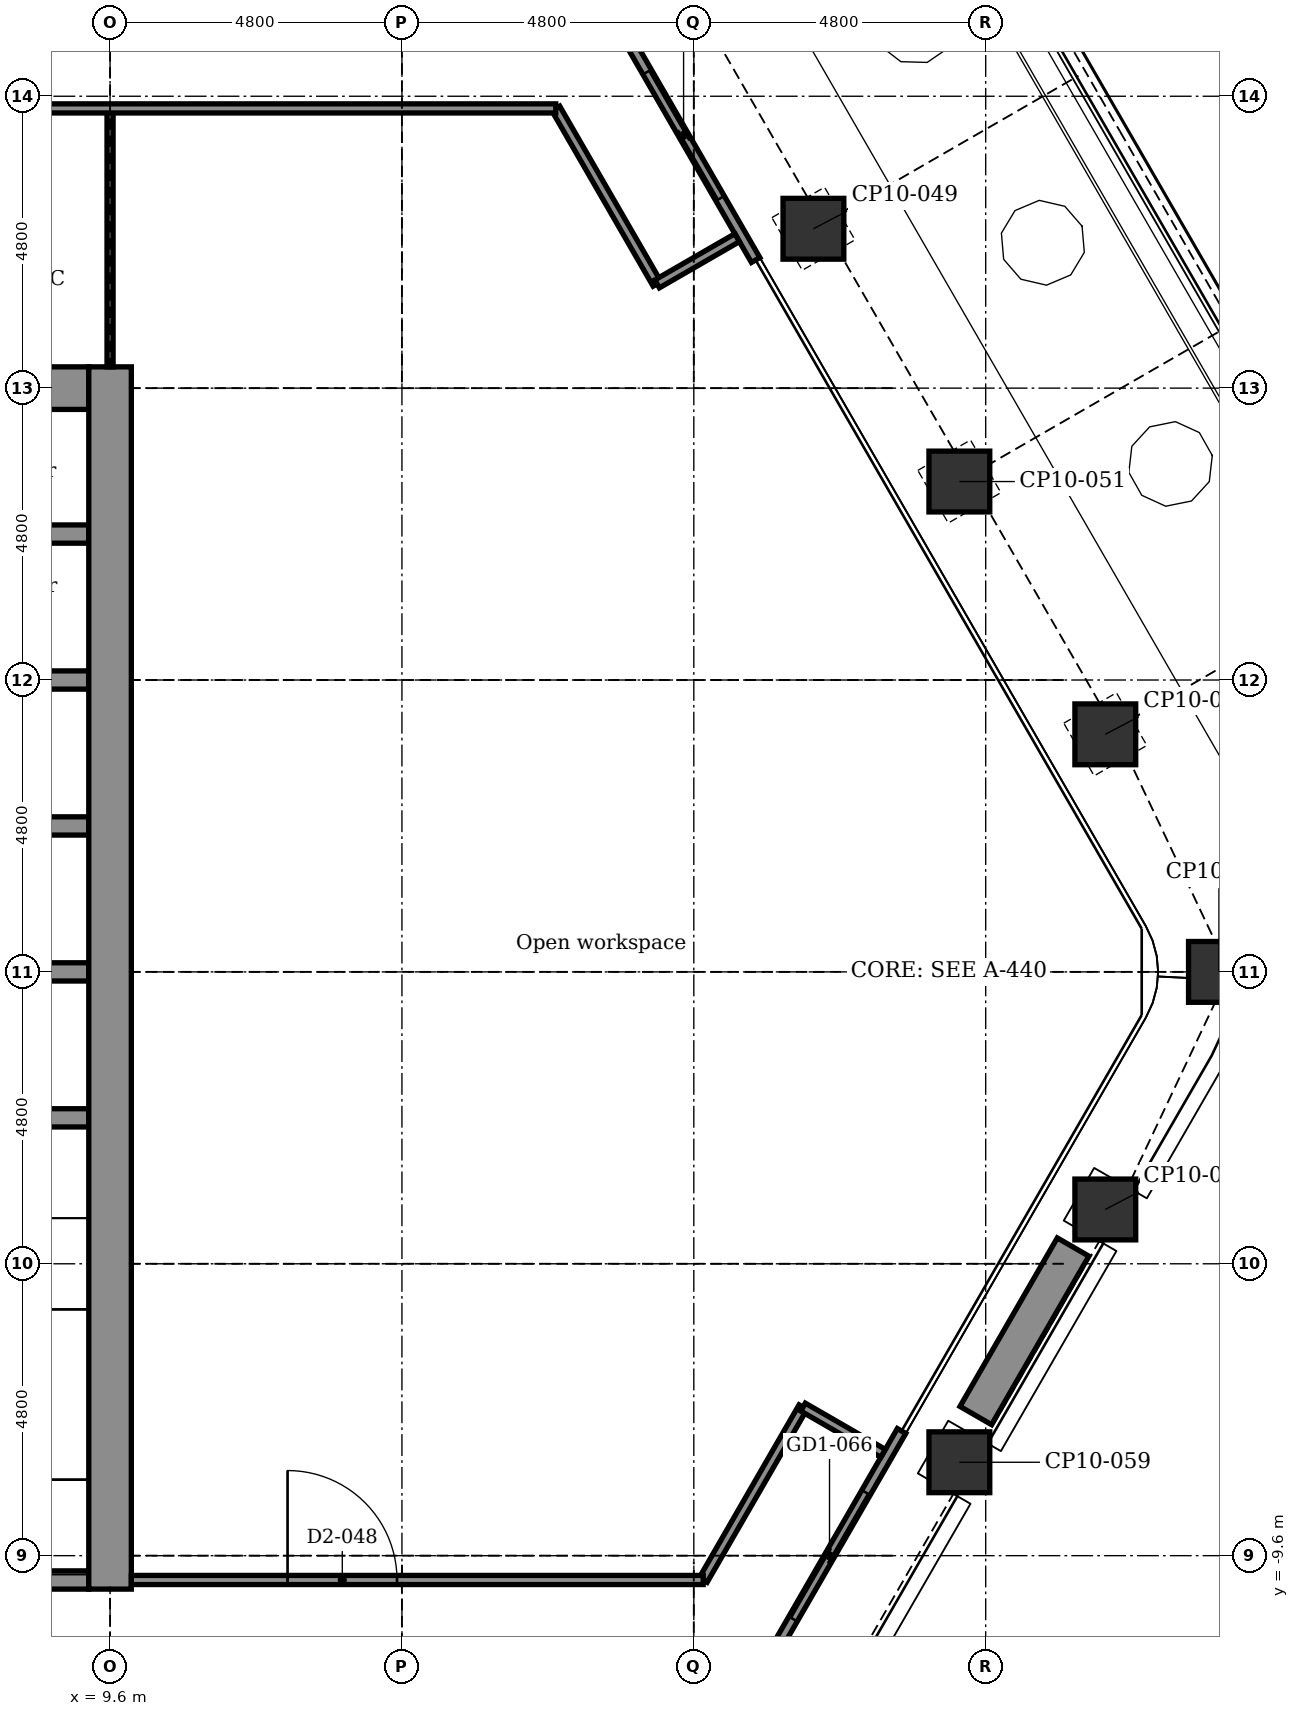
"""IFC4 building model, lengths in metres.
Left out: names, types, materials, properties, quantities, classifications, styles, units other than length and angle.
Written with IfcOpenShell. Run it as: python <this file> out.ifc"""

import sys

from ifc_helpers import new_model, si_unit, direction, frame, frame_2d, origin, origin_2d, place, context, subcontext, project, spatial, rectangle, extrude, element, fill, save


model = new_model("IFC4")
c1 = context("Model", 3, precision=1e-05, world=origin(), true_north=direction((0.0, 1.0)))
c2 = subcontext(c1, "Body", "Model", "MODEL_VIEW")
j1 = project(units=[si_unit("LENGTHUNIT", "METRE"), si_unit("PLANEANGLEUNIT", "RADIAN")], contexts=[c1])
p1 = place(None, origin())
s1 = spatial("IfcSite", under=j1, at=p1, CompositionType="ELEMENT")
p2 = place(p1, origin())
s2 = spatial("IfcBuilding", under=s1, at=p2, CompositionType="ELEMENT")
p3 = place(p2, frame((0.0, 0.0, 166.1)))
s3 = spatial("IfcBuildingStorey", under=s2, at=p3, CompositionType="ELEMENT", Elevation=166.1)
for number, where, z_axis, x_axis in (
    (1, (21.167, 12.221, -0.15), (0.0, 0.0, 1.0), (0.866, 0.5, 0.0)),
    (2, (23.567, 8.064, -0.15), (0.0, 0.0, 1.0), (0.866, 0.5, 0.0)),
    (3, (25.967, 3.907, -0.15), (0.0, 0.0, 1.0), (0.866, 0.5, 0.0)),
    (4, (27.836, 0.0, -0.15), (0.0, 0.0, 1.0), (1.0, 0.0, 0.0)),
    (5, (25.967, -3.907, -0.15), (0.0, 0.0, 1.0), (0.5, 0.866, 0.0)),
    (6, (23.567, -8.064, -0.15), (0.0, 0.0, 1.0), (0.5, 0.866, 0.0)),
):
    element("IfcColumn", number, at=place(p3, frame(where, z_axis=z_axis, x_axis=x_axis)), inside=s3, PredefinedType="COLUMN", context=c2, shape_type="SweptSolid", body=[
        extrude(rectangle(XDim=1.0, YDim=1.0, at=origin_2d()), origin(), (0.0, 0.0, 1.0), 3.9),
    ])
p4 = place(p3, frame((4.95, -10.0, -0.15), z_axis=(0.0, 0.0, 1.0), x_axis=(1.0, 0.0, 0.0)))
e7 = element("IfcWall", 7, at=p4, inside=s3, PredefinedType="STANDARD", context=c2, shape_type="SweptSolid", body=[
    extrude(rectangle(XDim=4.3, YDim=0.3, at=frame_2d((2.15, 0.0))), origin(), (0.0, 0.0, 1.0), 3.9),
])
for number, where, z_axis, x_axis in (
    (8, (6.15, -2.4, -0.15), (0.0, 0.0, 1.0), (1.0, 0.0, 0.0)),
    (9, (6.15, 0.0, -0.15), (0.0, 0.0, 1.0), (1.0, 0.0, 0.0)),
    (10, (6.15, 2.4, -0.15), (0.0, 0.0, 1.0), (1.0, 0.0, 0.0)),
    (11, (6.15, 4.8, -0.15), (0.0, 0.0, 1.0), (1.0, 0.0, 0.0)),
):
    element("IfcWall", number, at=place(p3, frame(where, z_axis=z_axis, x_axis=x_axis)), inside=s3, PredefinedType="STANDARD", context=c2, shape_type="SweptSolid", body=[
        extrude(rectangle(XDim=3.1, YDim=0.3, at=frame_2d((1.55, 0.0))), origin(), (0.0, 0.0, 1.0), 3.9),
    ])
p5 = place(p3, frame((6.0, 7.2, -0.15), z_axis=(0.0, 0.0, 1.0), x_axis=(1.0, 0.0, 0.0)))
e12 = element("IfcWall", 12, at=p5, inside=s3, PredefinedType="STANDARD", context=c2, shape_type="SweptSolid", body=[
    extrude(rectangle(XDim=3.25, YDim=0.3, at=frame_2d((1.625, 0.0))), origin(), (0.0, 0.0, 1.0), 3.9),
])
p6 = place(p3, frame((-5.25, 9.6, -0.15), z_axis=(0.0, 0.0, 1.0), x_axis=(1.0, 0.0, 0.0)))
e13 = element("IfcWall", 13, at=p6, inside=s3, PredefinedType="SHEAR", context=c2, shape_type="SweptSolid", body=[
    extrude(rectangle(XDim=14.5, YDim=0.7, at=frame_2d((7.25, 0.0))), origin(), (0.0, 0.0, 1.0), 3.9),
])
p7 = place(p6, frame((9.35, 0.0, 0.15)))
e14 = element("IfcOpeningElement", 14, at=p7, cuts=e13, PredefinedType="OPENING", context=c2, shape_type="SweptSolid", body=[
    extrude(rectangle(XDim=1.4, YDim=2.1, at=frame_2d((0.7, 1.05))), frame((0.0, 0.36, 0.0), z_axis=(0.0, -1.0, 0.0), x_axis=(1.0, 0.0, 0.0)), (0.0, 0.0, 1.0), 0.72),
])
p8 = place(p3, frame((9.6, -10.15, -0.15), z_axis=(0.0, 0.0, 1.0), x_axis=(0.0, 1.0, 0.0)))
e15 = element("IfcWall", 15, at=p8, inside=s3, PredefinedType="SHEAR", context=c2, shape_type="SweptSolid", body=[
    extrude(rectangle(XDim=20.1, YDim=0.7, at=frame_2d((10.05, 0.0))), origin(), (0.0, 0.0, 1.0), 3.9),
])
p9 = place(p3, frame((17.847, 15.812, 0.0), z_axis=(0.0, 0.0, 1.0), x_axis=(0.5000167099, -0.866015756104, 0.0)))
e16 = element("IfcWall", 16, at=p9, inside=s3, PredefinedType="PARTITIONING", context=c2, shape_type="SweptSolid", body=[
    extrude(rectangle(XDim=4.74, YDim=0.16, at=frame_2d((2.37, 0.0))), origin(), (0.0, 0.0, 1.0), 3.75),
])
p10 = place(p9, frame((1.17, 0.0, 0.0)))
e17 = element("IfcOpeningElement", 17, at=p10, cuts=e16, PredefinedType="OPENING", context=c2, shape_type="SweptSolid", body=[
    extrude(rectangle(XDim=2.4, YDim=2.4, at=frame_2d((1.2, 1.2))), frame((0.0, 0.09, 0.0), z_axis=(0.0, -1.0, 0.0), x_axis=(1.0, 0.0, 0.0)), (0.0, 0.0, 1.0), 0.18),
])
p11 = place(p3, frame((22.617, -7.55, 0.0), z_axis=(0.0, 0.0, 1.0), x_axis=(-0.5000167099, -0.866015756104, 0.0)))
e18 = element("IfcWall", 18, at=p11, inside=s3, PredefinedType="PARTITIONING", context=c2, shape_type="SweptSolid", body=[
    extrude(rectangle(XDim=4.74, YDim=0.16, at=frame_2d((2.37, 0.0))), origin(), (0.0, 0.0, 1.0), 3.75),
])
p12 = place(p11, frame((1.17, 0.0, 0.0)))
e19 = element("IfcOpeningElement", 19, at=p12, cuts=e18, PredefinedType="OPENING", context=c2, shape_type="SweptSolid", body=[
    extrude(rectangle(XDim=2.4, YDim=2.4, at=frame_2d((1.2, 1.2))), frame((0.0, 0.09, 0.0), z_axis=(0.0, -1.0, 0.0), x_axis=(1.0, 0.0, 0.0)), (0.0, 0.0, 1.0), 0.18),
])
p13 = place(p3, frame((25.437, -4.525, 0.0), z_axis=(0.0, 0.0, 1.0), x_axis=(-0.499938187974, -0.866061088033, 0.0)))
e20 = element("IfcWall", 20, at=p13, inside=s3, PredefinedType="USERDEFINED", context=c2, shape_type="SweptSolid", body=[
    extrude(rectangle(XDim=3.2, YDim=0.6, at=frame_2d((1.6, 0.0))), origin(), (0.0, 0.0, 1.0), 0.7),
])
p14 = place(p3, frame((9.6, 9.95, 0.0), z_axis=(0.0, 0.0, 1.0), x_axis=(0.0, 1.0, 0.0)))
e21 = element("IfcWall", 21, at=p14, inside=s3, PredefinedType="PARTITIONING", context=c2, shape_type="SweptSolid", body=[
    extrude(rectangle(XDim=4.25, YDim=0.1, at=frame_2d((2.125, 0.0))), origin(), (0.0, 0.0, 1.0), 3.066),
])
p15 = place(p3, frame((16.93, 14.2, 0.0), z_axis=(0.0, 0.0, 1.0), x_axis=(0.499976106316, -0.86603919837, 0.0)))
e22 = element("IfcWall", 22, at=p15, inside=s3, PredefinedType="PARTITIONING", context=c2, shape_type="SweptSolid", body=[
    extrude(rectangle(XDim=3.333, YDim=0.15, at=frame_2d((1.667, 0.0))), origin(), (0.0, 0.0, 1.0), 3.75),
])
p16 = place(p3, frame((19.354, -10.0, 0.0), z_axis=(0.0, 0.0, 1.0), x_axis=(0.500009969958, 0.86601964755, 0.0)))
e23 = element("IfcWall", 23, at=p16, inside=s3, PredefinedType="PARTITIONING", context=c2, shape_type="SweptSolid", body=[
    extrude(rectangle(XDim=3.283, YDim=0.15, at=frame_2d((1.642, 0.0))), origin(), (0.0, 0.0, 1.0), 3.75),
])
p17 = place(p3, frame((20.996, -7.157, 0.0), z_axis=(0.0, 0.0, 1.0), x_axis=(0.865960906633, -0.500111695708, 0.0)))
e24 = element("IfcWall", 24, at=p17, inside=s3, PredefinedType="PARTITIONING", context=c2, shape_type="SweptSolid", body=[
    extrude(rectangle(XDim=1.52, YDim=0.15, at=frame_2d((0.76, 0.0))), origin(), (0.0, 0.0, 1.0), 3.75),
])
p18 = place(p3, frame((18.596, 11.314, 0.0), z_axis=(0.0, 0.0, 1.0), x_axis=(0.866030456496, 0.499991248344, 0.0)))
e25 = element("IfcWall", 25, at=p18, inside=s3, PredefinedType="PARTITIONING", context=c2, shape_type="SweptSolid", body=[
    extrude(rectangle(XDim=1.52, YDim=0.15, at=frame_2d((0.76, 0.0))), origin(), (0.0, 0.0, 1.0), 3.75),
])
p19 = place(p3, frame((9.95, -10.0, 0.0), z_axis=(0.0, 0.0, 1.0), x_axis=(1.0, 0.0, 0.0)))
e26 = element("IfcWall", 26, at=p19, inside=s3, PredefinedType="PARTITIONING", context=c2, shape_type="SweptSolid", body=[
    extrude(rectangle(XDim=9.405, YDim=0.15, at=frame_2d((4.702, 0.0))), origin(), (0.0, 0.0, 1.0), 3.75),
])
p20 = place(p19, frame((2.569, 0.0, 0.0)))
e27 = element("IfcOpeningElement", 27, at=p20, cuts=e26, PredefinedType="OPENING", context=c2, shape_type="SweptSolid", body=[
    extrude(rectangle(XDim=1.8, YDim=2.1, at=frame_2d((0.9, 1.05))), frame((0.0, 0.085, 0.0), z_axis=(0.0, -1.0, 0.0), x_axis=(1.0, 0.0, 0.0)), (0.0, 0.0, 1.0), 0.17),
])
p21 = place(p3, frame((6.0, 14.2, 0.0), z_axis=(0.0, 0.0, 1.0), x_axis=(1.0, 0.0, 0.0)))
e28 = element("IfcWall", 28, at=p21, inside=s3, PredefinedType="PARTITIONING", context=c2, shape_type="SweptSolid", body=[
    extrude(rectangle(XDim=10.93, YDim=0.15, at=frame_2d((5.465, 0.0))), origin(), (0.0, 0.0, 1.0), 3.75),
])
p22 = place(p10, origin())
e29 = element("IfcDoor", 29, at=p22, inside=s3, OperationType="DOUBLE_DOOR_SLIDING", PredefinedType="DOOR", context=c2, shape_type="SweptSolid", body=[
    extrude(rectangle(XDim=2.4, YDim=2.4, at=frame_2d((1.2, 1.2))), frame((0.0, 0.025, 0.0), z_axis=(0.0, -1.0, 0.0), x_axis=(1.0, 0.0, 0.0)), (0.0, 0.0, 1.0), 0.05),
])
fill(e17, e29)
p23 = place(p12, origin())
e30 = element("IfcDoor", 30, at=p23, inside=s3, OperationType="DOUBLE_DOOR_SLIDING", PredefinedType="DOOR", context=c2, shape_type="SweptSolid", body=[
    extrude(rectangle(XDim=2.4, YDim=2.4, at=frame_2d((1.2, 1.2))), frame((0.0, 0.025, 0.0), z_axis=(0.0, -1.0, 0.0), x_axis=(1.0, 0.0, 0.0)), (0.0, 0.0, 1.0), 0.05),
])
fill(e19, e30)
p24 = place(p20, origin())
e31 = element("IfcDoor", 31, at=p24, inside=s3, OperationType="SINGLE_SWING_LEFT", PredefinedType="DOOR", context=c2, shape_type="SweptSolid", body=[
    extrude(rectangle(XDim=1.8, YDim=2.1, at=frame_2d((0.9, 1.05))), frame((0.0, 0.025, 0.0), z_axis=(0.0, -1.0, 0.0), x_axis=(1.0, 0.0, 0.0)), (0.0, 0.0, 1.0), 0.05),
])
fill(e27, e31)
save(model, sys.argv[1])
